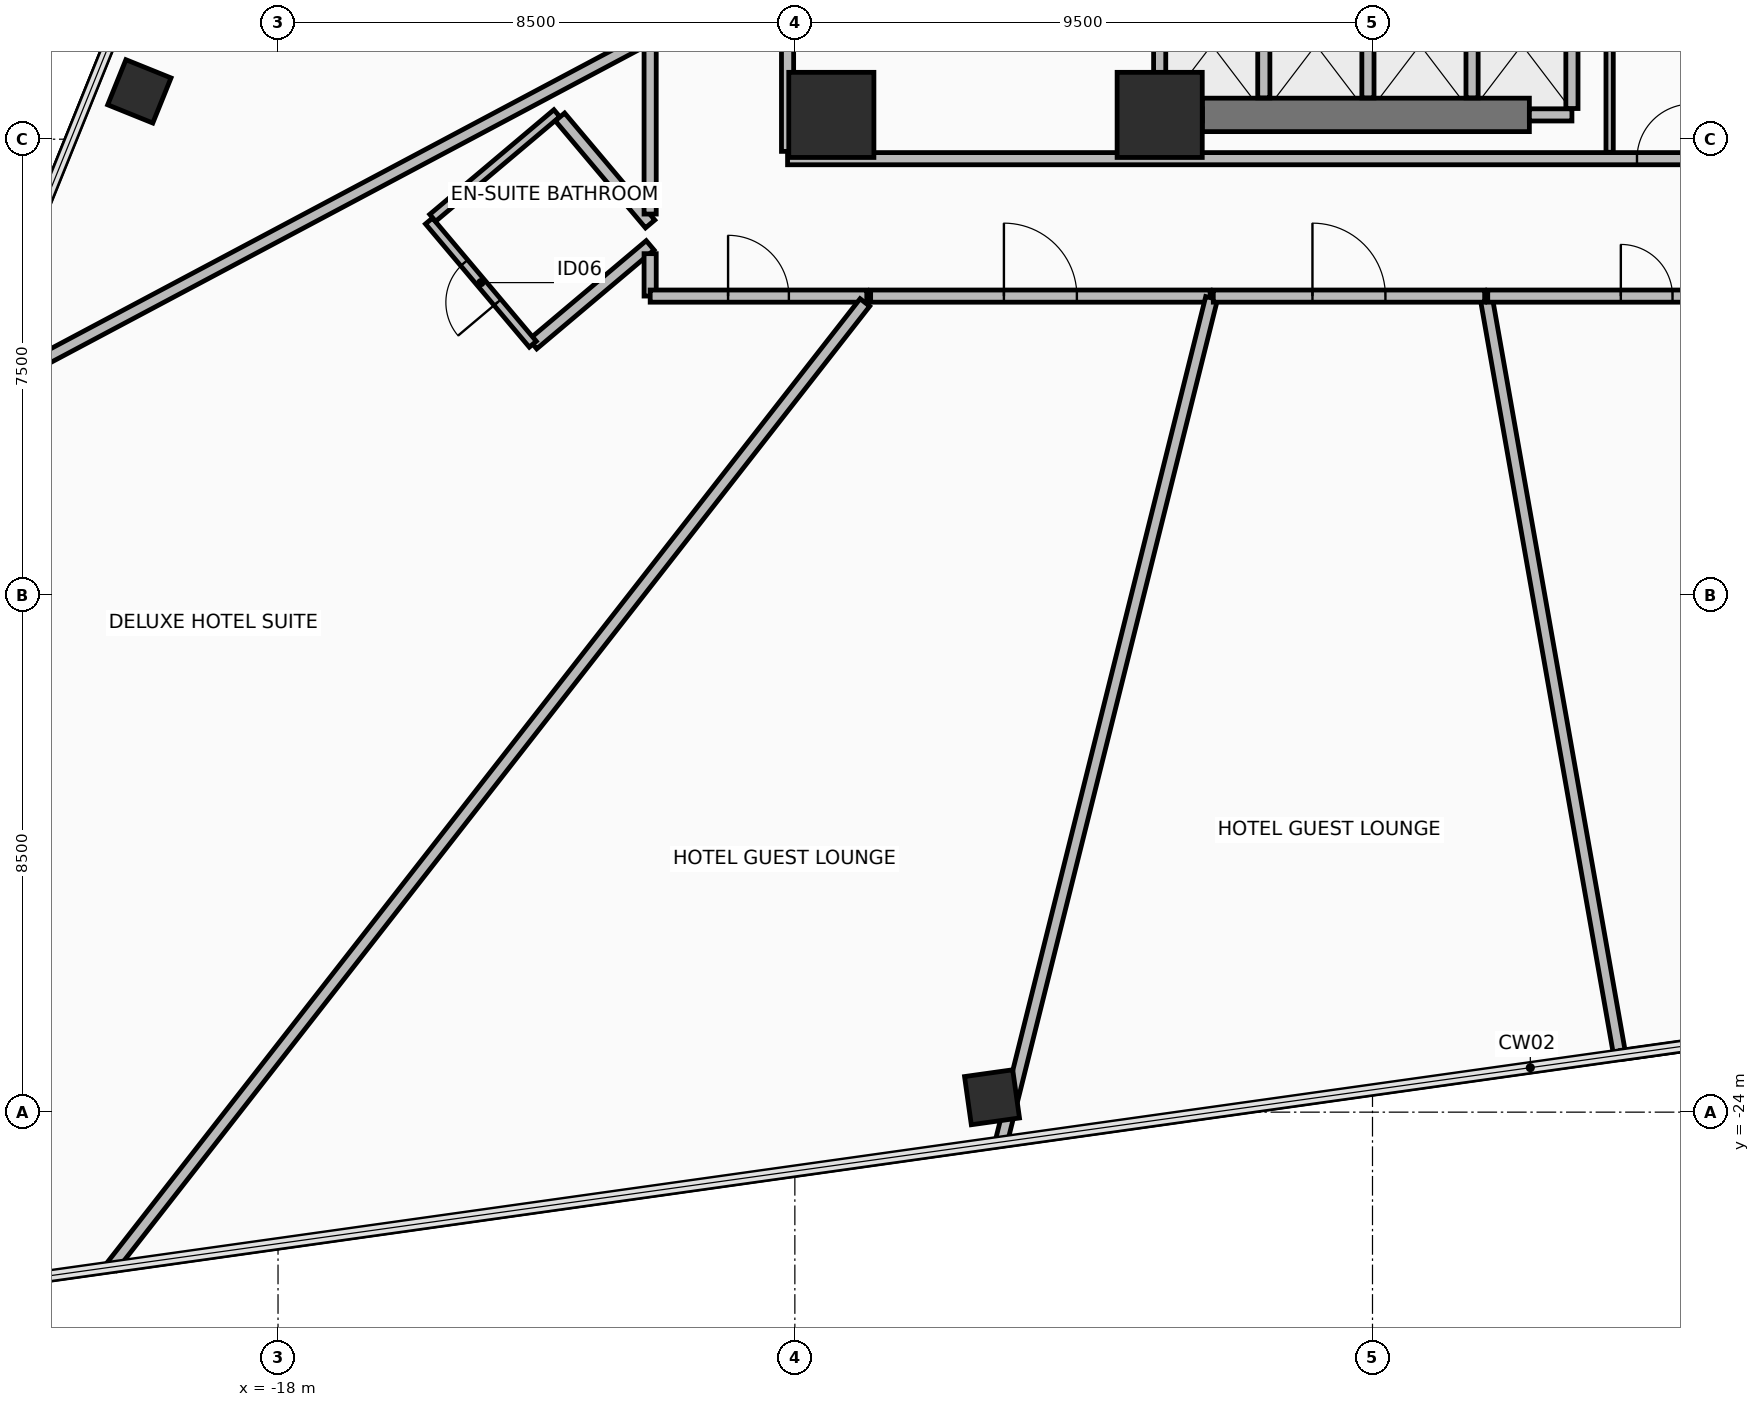
"""IFC4 building model, lengths in metres.
Left out: names, types, materials, properties, quantities, classifications, styles, units other than length and angle.
Written with IfcOpenShell. Run it as: python <this file> out.ifc"""

import sys

from ifc_helpers import new_model, si_unit, direction, frame, frame_2d, origin, origin_2d, place, context, subcontext, project, spatial, rectangle, hollow_rectangle, extrude, element, fill, save


model = new_model("IFC4")
c1 = context("Model", 3, precision=1e-05, world=origin(), true_north=direction((0.0, 1.0)))
c2 = subcontext(c1, "Body", "Model", "MODEL_VIEW")
j1 = project(units=[si_unit("LENGTHUNIT", "METRE"), si_unit("PLANEANGLEUNIT", "RADIAN")], contexts=[c1])
p1 = place(None, origin())
s1 = spatial("IfcSite", under=j1, at=p1, CompositionType="ELEMENT")
p2 = place(p1, origin())
s2 = spatial("IfcBuilding", under=s1, at=p2, CompositionType="ELEMENT")
p3 = place(p2, frame((0.0, 0.0, 67.3)))
s3 = spatial("IfcBuildingStorey", under=s2, at=p3, CompositionType="ELEMENT", Elevation=67.3)
for number, where, z_axis, x_axis in (
    (1, (-8.9, -7.6, 0.0), (0.0, 0.0, 1.0), (1.0, 0.0, 0.0)),
    (2, (-3.5, -7.6, 0.0), (0.0, 0.0, 1.0), (1.0, 0.0, 0.0)),
):
    element("IfcColumn", number, at=place(p3, frame(where, z_axis=z_axis, x_axis=x_axis)), inside=s3, PredefinedType="COLUMN", context=c2, shape_type="SweptSolid", body=[
        extrude(rectangle(XDim=1.4, YDim=1.4, at=origin_2d()), origin(), (0.0, 0.0, 1.0), 3.45),
    ])
for number, where, z_axis, x_axis in (
    (3, (-20.281, -7.213, 0.0), (0.0, 0.0, 1.0), (0.375, 0.927, 0.0)),
    (4, (-6.257, -23.755, 0.0), (0.0, 0.0, 1.0), (0.99, 0.139, 0.0)),
):
    element("IfcColumn", number, at=place(p3, frame(where, z_axis=z_axis, x_axis=x_axis)), inside=s3, PredefinedType="COLUMN", context=c2, shape_type="SweptSolid", body=[
        extrude(hollow_rectangle(XDim=0.8, YDim=0.8, WallThickness=0.045, at=origin_2d()), origin(), (0.0, 0.0, 1.0), 3.45),
    ])
p4 = place(p3, frame((-2.8, -7.6, 0.0), z_axis=(0.0, 0.0, 1.0), x_axis=(1.0, 0.0, 0.0)))
e5 = element("IfcWall", 5, at=p4, inside=s3, PredefinedType="SHEAR", context=c2, shape_type="SweptSolid", body=[
    extrude(rectangle(XDim=5.38, YDim=0.55, at=frame_2d((2.69, 0.0))), origin(), (0.0, 0.0, 1.0), 3.275),
])
p5 = place(p3, frame((-9.62, -8.32, 0.0), z_axis=(0.0, 0.0, 1.0), x_axis=(1.0, 0.0, 0.0)))
e6 = element("IfcWall", 6, at=p5, inside=s3, PredefinedType="PARTITIONING", context=c2, shape_type="SweptSolid", body=[
    extrude(rectangle(XDim=19.24, YDim=0.2, at=frame_2d((9.62, 0.0))), origin(), (0.0, 0.0, 1.0), 2.67),
])
p6 = place(p5, frame((13.97, 0.0, 0.0)))
e7 = element("IfcOpeningElement", 7, at=p6, cuts=e6, PredefinedType="OPENING", context=c2, shape_type="SweptSolid", body=[
    extrude(rectangle(XDim=0.9, YDim=2.1, at=frame_2d((0.45, 1.05))), frame((0.0, 0.11, 0.0), z_axis=(0.0, -1.0, 0.0), x_axis=(1.0, 0.0, 0.0)), (0.0, 0.0, 1.0), 0.22),
])
p7 = place(p3, frame((-9.62, 8.2, 0.0), z_axis=(0.0, 0.0, 1.0), x_axis=(0.0, -1.0, 0.0)))
e8 = element("IfcWall", 8, at=p7, inside=s3, PredefinedType="PARTITIONING", context=c2, shape_type="SweptSolid", body=[
    extrude(rectangle(XDim=16.4, YDim=0.2, at=frame_2d((8.2, 0.0))), origin(), (0.0, 0.0, 1.0), 2.67),
])
p8 = place(p7, frame((12.65, 0.0, 0.0)))
e9 = element("IfcOpeningElement", 9, at=p8, cuts=e8, PredefinedType="OPENING", context=c2, shape_type="SweptSolid", body=[
    extrude(rectangle(XDim=1.1, YDim=2.15, at=frame_2d((0.55, 1.075))), frame((0.0, 0.11, 0.0), z_axis=(0.0, -1.0, 0.0), x_axis=(1.0, 0.0, 0.0)), (0.0, 0.0, 1.0), 0.22),
])
p9 = place(p3, frame((-3.5, -7.6, 0.0), z_axis=(0.0, 0.0, 1.0), x_axis=(1.0, 0.0, 0.0)))
e10 = element("IfcWall", 10, at=p9, inside=s3, PredefinedType="PARTITIONING", context=c2, shape_type="SweptSolid", body=[
    extrude(rectangle(XDim=0.7, YDim=0.2, at=frame_2d((0.35, 0.0))), origin(), (0.0, 0.0, 1.0), 2.47),
])
p10 = place(p3, frame((-3.5, -7.495, 0.0), z_axis=(0.0, 0.0, 1.0), x_axis=(0.0, 1.0, 0.0)))
e11 = element("IfcWall", 11, at=p10, inside=s3, PredefinedType="PARTITIONING", context=c2, shape_type="SweptSolid", body=[
    extrude(rectangle(XDim=2.065, YDim=0.2, at=frame_2d((1.033, 0.0))), origin(), (0.0, 0.0, 1.0), 2.47),
])
for number, where, z_axis, x_axis in (
    (12, (-1.788, -7.32, 0.0), (0.0, 0.0, 1.0), (0.0, 1.0, 0.0)),
    (13, (-0.075, -7.32, 0.0), (0.0, 0.0, 1.0), (0.0, 1.0, 0.0)),
    (14, (1.637, -7.32, 0.0), (0.0, 0.0, 1.0), (0.0, 1.0, 0.0)),
):
    element("IfcWall", number, at=place(p3, frame(where, z_axis=z_axis, x_axis=x_axis)), inside=s3, PredefinedType="PARTITIONING", context=c2, shape_type="SweptSolid", body=[
        extrude(rectangle(XDim=1.89, YDim=0.2, at=frame_2d((0.945, 0.0))), origin(), (0.0, 0.0, 1.0), 3.275),
    ])
p11 = place(p3, frame((2.58, -7.6, 0.0), z_axis=(0.0, 0.0, 1.0), x_axis=(1.0, 0.0, 0.0)))
e15 = element("IfcWall", 15, at=p11, inside=s3, PredefinedType="PARTITIONING", context=c2, shape_type="SweptSolid", body=[
    extrude(rectangle(XDim=0.7, YDim=0.2, at=frame_2d((0.35, 0.0))), origin(), (0.0, 0.0, 1.0), 2.47),
])
p12 = place(p3, frame((3.28, -7.495, 0.0), z_axis=(0.0, 0.0, 1.0), x_axis=(0.0, 1.0, 0.0)))
e16 = element("IfcWall", 16, at=p12, inside=s3, PredefinedType="PARTITIONING", context=c2, shape_type="SweptSolid", body=[
    extrude(rectangle(XDim=2.065, YDim=0.2, at=frame_2d((1.033, 0.0))), origin(), (0.0, 0.0, 1.0), 2.47),
])
p13 = place(p3, frame((3.9, -5.665, 0.0), z_axis=(0.0, 0.0, 1.0), x_axis=(0.0, -1.0, 0.0)))
e17 = element("IfcWall", 17, at=p13, inside=s3, PredefinedType="PARTITIONING", context=c2, shape_type="SweptSolid", body=[
    extrude(rectangle(XDim=2.55, YDim=0.12, at=frame_2d((1.275, 0.0))), origin(), (0.0, 0.0, 1.0), 2.47),
])
p14 = place(p3, frame((-11.88, -9.745, 0.0), z_axis=(0.0, 0.0, 1.0), x_axis=(-0.764712982519, -0.644371053328, 0.0)))
e18 = element("IfcWall", 18, at=p14, inside=s3, PredefinedType="PARTITIONING", context=c2, shape_type="SweptSolid", body=[
    extrude(rectangle(XDim=2.524, YDim=0.2, at=frame_2d((1.262, 0.0))), origin(), (0.0, 0.0, 1.0), 3.275),
])
p15 = place(p3, frame((-13.81, -11.371, 0.0), z_axis=(0.0, 0.0, 1.0), x_axis=(-0.644478981733, 0.764622025647, 0.0)))
e19 = element("IfcWall", 19, at=p15, inside=s3, PredefinedType="PARTITIONING", context=c2, shape_type="SweptSolid", body=[
    extrude(rectangle(XDim=2.65, YDim=0.15, at=frame_2d((1.325, 0.0))), origin(), (0.0, 0.0, 1.0), 2.87),
])
p16 = place(p15, frame((0.9, 0.0, 0.0)))
e20 = element("IfcOpeningElement", 20, at=p16, cuts=e19, PredefinedType="OPENING", context=c2, shape_type="SweptSolid", body=[
    extrude(rectangle(XDim=0.85, YDim=2.1, at=frame_2d((0.425, 1.05))), frame((0.0, 0.085, 0.0), z_axis=(0.0, -1.0, 0.0), x_axis=(1.0, 0.0, 0.0)), (0.0, 0.0, 1.0), 0.17),
])
p17 = place(p3, frame((-15.456, -9.293, 0.0), z_axis=(0.0, 0.0, 1.0), x_axis=(0.764709608169, 0.644375057846, 0.0)))
e21 = element("IfcWall", 21, at=p17, inside=s3, PredefinedType="PARTITIONING", context=c2, shape_type="SweptSolid", body=[
    extrude(rectangle(XDim=2.67, YDim=0.15, at=frame_2d((1.335, 0.0))), origin(), (0.0, 0.0, 1.0), 2.67),
])
p18 = place(p3, frame((-13.363, -7.634, 0.0), z_axis=(0.0, 0.0, 1.0), x_axis=(0.644400290836, -0.764688345125, 0.0)))
e22 = element("IfcWall", 22, at=p18, inside=s3, PredefinedType="PARTITIONING", context=c2, shape_type="SweptSolid", body=[
    extrude(rectangle(XDim=2.302, YDim=0.2, at=frame_2d((1.151, 0.0))), origin(), (0.0, 0.0, 1.0), 2.67),
])
p19 = place(p3, frame((-11.893, -6.324, 0.0), z_axis=(0.0, 0.0, 1.0), x_axis=(-0.882946043117, -0.469474477416, 0.0)))
e23 = element("IfcWall", 23, at=p19, inside=s3, PredefinedType="PARTITIONING", context=c2, shape_type="SweptSolid", body=[
    extrude(rectangle(XDim=12.747, YDim=0.2, at=frame_2d((6.374, 0.0))), origin(), (0.0, 0.0, 1.0), 2.47),
])
p20 = place(p3, frame((-23.087, -12.156, 0.0), z_axis=(0.0, 0.0, 1.0), x_axis=(0.374605375648, 0.927184346576, 0.0)))
e24 = element("IfcWall", 24, at=p20, inside=s3, PredefinedType="PARTITIONING", context=c2, shape_type="SweptSolid", body=[
    extrude(rectangle(XDim=11.685, YDim=0.15, at=frame_2d((5.842, 0.0))), origin(), (0.0, 0.0, 1.0), 3.275),
])
p21 = place(p3, frame((4.062, -23.038, 0.0), z_axis=(0.0, 0.0, 1.0), x_axis=(-0.173658422676, 0.984805946486, 0.0)))
e25 = element("IfcWall", 25, at=p21, inside=s3, PredefinedType="PARTITIONING", context=c2, shape_type="SweptSolid", body=[
    extrude(rectangle(XDim=12.62, YDim=0.2, at=frame_2d((6.31, 0.0))), origin(), (0.0, 0.0, 1.0), 2.47),
])
p22 = place(p3, frame((1.895, -10.58, 0.0), z_axis=(0.0, 0.0, 1.0), x_axis=(1.0, 0.0, 0.0)))
e26 = element("IfcWall", 26, at=p22, inside=s3, PredefinedType="PARTITIONING", context=c2, shape_type="SweptSolid", body=[
    extrude(rectangle(XDim=5.228, YDim=0.2, at=frame_2d((2.614, 0.0))), origin(), (0.0, 0.0, 1.0), 3.275),
])
p23 = place(p22, frame((2.189, 0.0, 0.0)))
e27 = element("IfcOpeningElement", 27, at=p23, cuts=e26, PredefinedType="OPENING", context=c2, shape_type="SweptSolid", body=[
    extrude(rectangle(XDim=0.85, YDim=2.1, at=frame_2d((0.425, 1.05))), frame((0.0, 0.11, 0.0), z_axis=(0.0, -1.0, 0.0), x_axis=(1.0, 0.0, 0.0)), (0.0, 0.0, 1.0), 0.22),
])
p24 = place(p3, frame((14.445, -21.603, 0.0), z_axis=(0.0, 0.0, 1.0), x_axis=(-0.990270056923, -0.139158953581, 0.0)))
e28 = element("IfcWall", 28, at=p24, inside=s3, PredefinedType="PARTITIONING", context=c2, shape_type="SweptSolid", body=[
    extrude(rectangle(XDim=10.456, YDim=0.15, at=frame_2d((5.228, 0.0))), origin(), (0.0, 0.0, 1.0), 3.275),
])
p25 = place(p3, frame((-11.88, -6.436, 0.0), z_axis=(0.0, 0.0, 1.0), x_axis=(0.0, -1.0, 0.0)))
e29 = element("IfcWall", 29, at=p25, inside=s3, PredefinedType="PARTITIONING", context=c2, shape_type="SweptSolid", body=[
    extrude(rectangle(XDim=2.795, YDim=0.2, at=frame_2d((1.397, 0.0))), origin(), (0.0, 0.0, 1.0), 2.67),
])
p26 = place(p3, frame((-11.88, -9.882, 0.0), z_axis=(0.0, 0.0, 1.0), x_axis=(0.0, -1.0, 0.0)))
e30 = element("IfcWall", 30, at=p26, inside=s3, PredefinedType="PARTITIONING", context=c2, shape_type="SweptSolid", body=[
    extrude(rectangle(XDim=0.697, YDim=0.2, at=frame_2d((0.349, 0.0))), origin(), (0.0, 0.0, 1.0), 2.67),
])
p27 = place(p3, frame((-11.879, -10.58, 0.0), z_axis=(0.0, 0.0, 1.0), x_axis=(1.0, 0.0, 0.0)))
e31 = element("IfcWall", 31, at=p27, inside=s3, PredefinedType="PARTITIONING", context=c2, shape_type="SweptSolid", body=[
    extrude(rectangle(XDim=3.562, YDim=0.2, at=frame_2d((1.781, 0.0))), origin(), (0.0, 0.0, 1.0), 2.67),
])
p28 = place(p27, frame((1.281, 0.0, 0.0)))
e32 = element("IfcOpeningElement", 32, at=p28, cuts=e31, PredefinedType="OPENING", context=c2, shape_type="SweptSolid", body=[
    extrude(rectangle(XDim=1.0, YDim=2.15, at=frame_2d((0.5, 1.075))), frame((0.0, 0.11, 0.0), z_axis=(0.0, -1.0, 0.0), x_axis=(1.0, 0.0, 0.0)), (0.0, 0.0, 1.0), 0.22),
])
p29 = place(p3, frame((-8.348, -10.685, 0.0), z_axis=(0.0, 0.0, 1.0), x_axis=(-0.615661230884, -0.788010944585, 0.0)))
e33 = element("IfcWall", 33, at=p29, inside=s3, PredefinedType="PARTITIONING", context=c2, shape_type="SweptSolid", body=[
    extrude(rectangle(XDim=20.121, YDim=0.2, at=frame_2d((10.06, 0.0))), origin(), (0.0, 0.0, 1.0), 2.47),
])
p30 = place(p3, frame((-8.254, -10.58, 0.0), z_axis=(0.0, 0.0, 1.0), x_axis=(1.0, 0.0, 0.0)))
e34 = element("IfcWall", 34, at=p30, inside=s3, PredefinedType="PARTITIONING", context=c2, shape_type="SweptSolid", body=[
    extrude(rectangle(XDim=5.584, YDim=0.2, at=frame_2d((2.792, 0.0))), origin(), (0.0, 0.0, 1.0), 2.67),
])
p31 = place(p30, frame((2.192, 0.0, 0.0)))
e35 = element("IfcOpeningElement", 35, at=p31, cuts=e34, PredefinedType="OPENING", context=c2, shape_type="SweptSolid", body=[
    extrude(rectangle(XDim=1.2, YDim=2.15, at=frame_2d((0.6, 1.075))), frame((0.0, 0.11, 0.0), z_axis=(0.0, -1.0, 0.0), x_axis=(1.0, 0.0, 0.0)), (0.0, 0.0, 1.0), 0.22),
])
p32 = place(p3, frame((-2.646, -10.611, 0.0), z_axis=(0.0, 0.0, 1.0), x_axis=(-0.241928502378, -0.970294078997, 0.0)))
e36 = element("IfcWall", 36, at=p32, inside=s3, PredefinedType="PARTITIONING", context=c2, shape_type="SweptSolid", body=[
    extrude(rectangle(XDim=14.289, YDim=0.2, at=frame_2d((7.144, 0.0))), origin(), (0.0, 0.0, 1.0), 2.47),
])
p33 = place(p3, frame((-2.618, -10.58, 0.0), z_axis=(0.0, 0.0, 1.0), x_axis=(1.0, 0.0, 0.0)))
e37 = element("IfcWall", 37, at=p33, inside=s3, PredefinedType="PARTITIONING", context=c2, shape_type="SweptSolid", body=[
    extrude(rectangle(XDim=4.463, YDim=0.2, at=frame_2d((2.231, 0.0))), origin(), (0.0, 0.0, 1.0), 3.275),
])
p34 = place(p33, frame((1.631, 0.0, 0.0)))
e38 = element("IfcOpeningElement", 38, at=p34, cuts=e37, PredefinedType="OPENING", context=c2, shape_type="SweptSolid", body=[
    extrude(rectangle(XDim=1.2, YDim=2.15, at=frame_2d((0.6, 1.075))), frame((0.0, 0.11, 0.0), z_axis=(0.0, -1.0, 0.0), x_axis=(1.0, 0.0, 0.0)), (0.0, 0.0, 1.0), 0.22),
])
p35 = place(p6, frame((0.9, 0.0, 0.0), z_axis=(0.0, 0.0, 1.0), x_axis=(-1.0, 0.0, 0.0)))
e39 = element("IfcDoor", 39, at=p35, inside=s3, OperationType="SINGLE_SWING_LEFT", PredefinedType="DOOR", context=c2, shape_type="SweptSolid", body=[
    extrude(rectangle(XDim=0.9, YDim=2.1, at=frame_2d((0.45, 1.05))), frame((0.0, 0.025, 0.0), z_axis=(0.0, -1.0, 0.0), x_axis=(1.0, 0.0, 0.0)), (0.0, 0.0, 1.0), 0.05),
])
fill(e7, e39)
p36 = place(p16, origin())
e40 = element("IfcDoor", 40, at=p36, inside=s3, OperationType="SINGLE_SWING_RIGHT", PredefinedType="DOOR", context=c2, shape_type="SweptSolid", body=[
    extrude(rectangle(XDim=0.85, YDim=2.1, at=frame_2d((0.425, 1.05))), frame((0.0, 0.025, 0.0), z_axis=(0.0, -1.0, 0.0), x_axis=(1.0, 0.0, 0.0)), (0.0, 0.0, 1.0), 0.05),
])
fill(e20, e40)
p37 = place(p23, origin())
e41 = element("IfcDoor", 41, at=p37, inside=s3, OperationType="SINGLE_SWING_RIGHT", PredefinedType="DOOR", context=c2, shape_type="SweptSolid", body=[
    extrude(rectangle(XDim=0.85, YDim=2.1, at=frame_2d((0.425, 1.05))), frame((0.0, 0.025, 0.0), z_axis=(0.0, -1.0, 0.0), x_axis=(1.0, 0.0, 0.0)), (0.0, 0.0, 1.0), 0.05),
])
fill(e27, e41)
p38 = place(p28, origin())
e42 = element("IfcDoor", 42, at=p38, inside=s3, OperationType="SINGLE_SWING_LEFT", PredefinedType="DOOR", context=c2, shape_type="SweptSolid", body=[
    extrude(rectangle(XDim=1.0, YDim=2.15, at=frame_2d((0.5, 1.075))), frame((0.0, 0.025, 0.0), z_axis=(0.0, -1.0, 0.0), x_axis=(1.0, 0.0, 0.0)), (0.0, 0.0, 1.0), 0.05),
])
fill(e32, e42)
p39 = place(p31, origin())
e43 = element("IfcDoor", 43, at=p39, inside=s3, OperationType="SINGLE_SWING_LEFT", PredefinedType="DOOR", context=c2, shape_type="SweptSolid", body=[
    extrude(rectangle(XDim=1.2, YDim=2.15, at=frame_2d((0.6, 1.075))), frame((0.0, 0.025, 0.0), z_axis=(0.0, -1.0, 0.0), x_axis=(1.0, 0.0, 0.0)), (0.0, 0.0, 1.0), 0.05),
])
fill(e35, e43)
p40 = place(p34, origin())
e44 = element("IfcDoor", 44, at=p40, inside=s3, OperationType="SINGLE_SWING_LEFT", PredefinedType="DOOR", context=c2, shape_type="SweptSolid", body=[
    extrude(rectangle(XDim=1.2, YDim=2.15, at=frame_2d((0.6, 1.075))), frame((0.0, 0.025, 0.0), z_axis=(0.0, -1.0, 0.0), x_axis=(1.0, 0.0, 0.0)), (0.0, 0.0, 1.0), 0.05),
])
fill(e38, e44)
save(model, sys.argv[1])
